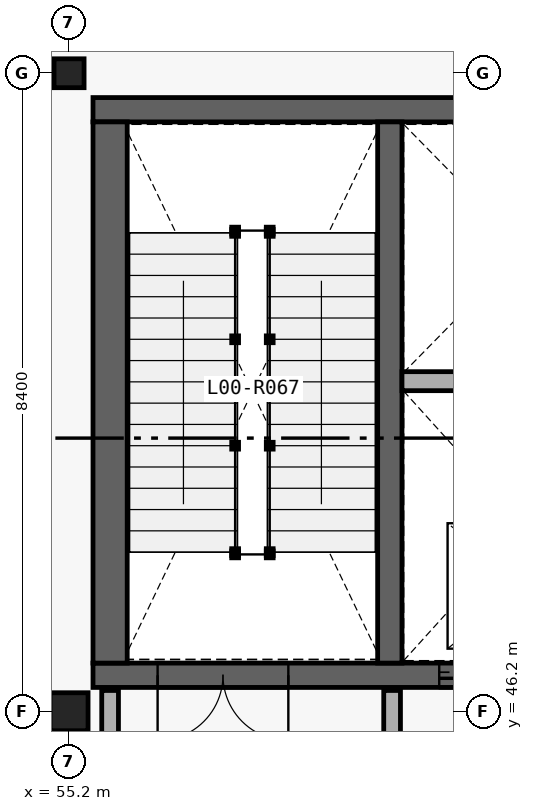
"""IFC4 building model, lengths in metres.
Left out: names, types, materials, properties, quantities, classifications, styles, units other than length and angle.
Written with IfcOpenShell. Run it as: python <this file> out.ifc"""

import sys

from ifc_helpers import new_model, si_unit, direction, frame, frame_2d, origin_with_axes, origin_2d_with_axis, place, context, subcontext, project, spatial, rectangle, i_section, extrude, element, fill, save


model = new_model("IFC4")
c1 = context("Model", 3, precision=1e-05, world=origin_with_axes(), true_north=direction((0.0, 1.0)))
c2 = subcontext(c1, "Body", "Model", "MODEL_VIEW")
j1 = project(units=[si_unit("LENGTHUNIT", "METRE"), si_unit("PLANEANGLEUNIT", "RADIAN")], contexts=[c1])
p1 = place(None, origin_with_axes())
s1 = spatial("IfcSite", under=j1, at=p1, CompositionType="ELEMENT")
p2 = place(p1, origin_with_axes())
s2 = spatial("IfcBuilding", under=s1, at=p2, CompositionType="ELEMENT")
p3 = place(p2, origin_with_axes())
s3 = spatial("IfcBuildingStorey", under=s2, at=p3, CompositionType="ELEMENT", Elevation=0.0)
p4 = place(None, frame((55.515, 46.68, 0.0), z_axis=(0.0, 0.0, 1.0), x_axis=(1.0, 0.0, 0.0)))
e1 = element("IfcWall", 1, at=p4, inside=s3, PredefinedType="SHEAR", context=c2, shape_type="SweptSolid", body=[
    extrude(rectangle(XDim=7.77, YDim=0.32, at=frame_2d((3.885, 0.0), x_axis=(1.0, 0.0))), origin_with_axes(), (0.0, 0.0, 1.0), 5.4),
])
p5 = place(None, frame((57.225, 46.68, 0.0), z_axis=(0.0, 0.0, 1.0), x_axis=(1.0, 0.0, 0.0)))
e2 = element("IfcOpeningElement", 2, at=p5, cuts=e1, PredefinedType="OPENING", context=c2, shape_type="SweptSolid", body=[
    extrude(rectangle(XDim=1.72, YDim=2.18, at=frame_2d((0.0, 1.09), x_axis=(1.0, 0.0))), frame((0.0, 0.17, 0.0), z_axis=(0.0, -1.0, 0.0), x_axis=(1.0, 0.0, 0.0)), (0.0, 0.0, 1.0), 0.34),
])
p6 = place(None, frame((60.65, 46.68, 0.0), z_axis=(0.0, 0.0, 1.0), x_axis=(1.0, 0.0, 0.0)))
e3 = element("IfcOpeningElement", 3, at=p6, cuts=e1, PredefinedType="OPENING", context=c2, shape_type="SweptSolid", body=[
    extrude(rectangle(XDim=1.16, YDim=2.2, at=frame_2d((0.0, 1.1), x_axis=(1.0, 0.0))), frame((0.0, 0.17, 0.0), z_axis=(0.0, -1.0, 0.0), x_axis=(1.0, 0.0, 0.0)), (0.0, 0.0, 1.0), 0.34),
])
p7 = place(None, frame((63.285, 54.12, 0.0), z_axis=(0.0, 0.0, 1.0), x_axis=(-1.0, 0.0, 0.0)))
e4 = element("IfcWall", 4, at=p7, inside=s3, PredefinedType="SHEAR", context=c2, shape_type="SweptSolid", body=[
    extrude(rectangle(XDim=7.77, YDim=0.32, at=frame_2d((3.885, 0.0), x_axis=(1.0, 0.0))), origin_with_axes(), (0.0, 0.0, 1.0), 5.4),
])
p8 = place(None, frame((55.74, 53.96, 0.0), z_axis=(0.0, 0.0, 1.0), x_axis=(0.0, -1.0, 0.0)))
e5 = element("IfcWall", 5, at=p8, inside=s3, PredefinedType="SHEAR", context=c2, shape_type="SweptSolid", body=[
    extrude(rectangle(XDim=7.12, YDim=0.45, at=frame_2d((3.56, 0.0), x_axis=(1.0, 0.0))), origin_with_axes(), (0.0, 0.0, 1.0), 5.4),
])
p9 = place(None, frame((59.42, 46.84, 0.0), z_axis=(0.0, 0.0, 1.0), x_axis=(0.0, 1.0, 0.0)))
e6 = element("IfcWall", 6, at=p9, inside=s3, PredefinedType="SHEAR", context=c2, shape_type="SweptSolid", body=[
    extrude(rectangle(XDim=7.12, YDim=0.32, at=frame_2d((3.56, 0.0), x_axis=(1.0, 0.0))), origin_with_axes(), (0.0, 0.0, 1.0), 5.4),
])
p10 = place(None, frame((59.58, 50.549, 0.0), z_axis=(0.0, 0.0, 1.0), x_axis=(1.0, 0.0, 0.0)))
e7 = element("IfcWall", 7, at=p10, inside=s3, PredefinedType="PARTITIONING", context=c2, shape_type="SweptSolid", body=[
    extrude(rectangle(XDim=3.255, YDim=0.25, at=frame_2d((1.627, 0.0), x_axis=(1.0, 0.0))), origin_with_axes(), (0.0, 0.0, 1.0), 5.08),
])
for number, where, z_axis, x_axis in (
    (8, (55.74, 45.22, 0.0), (0.0, 0.0, 1.0), (0.0, 1.0, 0.0)),
    (9, (59.45, 45.22, 0.0), (0.0, 0.0, 1.0), (0.0, 1.0, 0.0)),
):
    element("IfcWall", number, at=place(None, frame(where, z_axis=z_axis, x_axis=x_axis)), inside=s3, PredefinedType="PARTITIONING", context=c2, shape_type="SweptSolid", body=[
        extrude(rectangle(XDim=1.26, YDim=0.22, at=frame_2d((0.63, 0.0), x_axis=(1.0, 0.0))), origin_with_axes(), (0.0, 0.0, 1.0), 5.08),
    ])
p11 = place(None, frame((55.2, 46.2, 0.0), z_axis=(0.0, 0.0, 1.0), x_axis=(1.0, 0.0, 0.0)))
e10 = element("IfcColumn", 10, at=p11, inside=s3, PredefinedType="COLUMN", context=c2, shape_type="SweptSolid", body=[
    extrude(i_section(OverallWidth=0.5, OverallDepth=0.5, WebThickness=0.022, FlangeThickness=0.036, at=origin_2d_with_axis()), origin_with_axes(), (0.0, 0.0, 1.0), 5.4),
])
p12 = place(None, frame((55.2, 54.6, 0.0), z_axis=(0.0, 0.0, 1.0), x_axis=(1.0, 0.0, 0.0)))
e11 = element("IfcColumn", 11, at=p12, inside=s3, PredefinedType="COLUMN", context=c2, shape_type="SweptSolid", body=[
    extrude(i_section(OverallWidth=0.395, OverallDepth=0.38, WebThickness=0.019, FlangeThickness=0.03, at=origin_2d_with_axis()), origin_with_axes(), (0.0, 0.0, 1.0), 5.4),
])
p13 = place(None, frame((57.225, 46.68, 0.0), z_axis=(0.0, 0.0, 1.0), x_axis=(-1.0, 0.0, 0.0)))
e12 = element("IfcDoor", 12, at=p13, inside=s3, OperationType="DOUBLE_DOOR_SINGLE_SWING", PredefinedType="DOOR", context=c2, shape_type="SweptSolid", body=[
    extrude(rectangle(XDim=1.72, YDim=2.18, at=frame_2d((0.0, 1.09), x_axis=(1.0, 0.0))), frame((0.0, 0.04, 0.0), z_axis=(0.0, -1.0, 0.0), x_axis=(1.0, 0.0, 0.0)), (0.0, 0.0, 1.0), 0.08),
])
fill(e2, e12)
p14 = place(None, frame((60.65, 46.68, 0.0), z_axis=(0.0, 0.0, 1.0), x_axis=(-1.0, 0.0, 0.0)))
e13 = element("IfcDoor", 13, at=p14, inside=s3, OperationType="SLIDING_TO_LEFT", PredefinedType="DOOR", context=c2, shape_type="SweptSolid", body=[
    extrude(rectangle(XDim=1.16, YDim=2.2, at=frame_2d((0.0, 1.1), x_axis=(1.0, 0.0))), frame((0.0, 0.04, 0.0), z_axis=(0.0, -1.0, 0.0), x_axis=(1.0, 0.0, 0.0)), (0.0, 0.0, 1.0), 0.08),
])
fill(e3, e13)
save(model, sys.argv[1])
